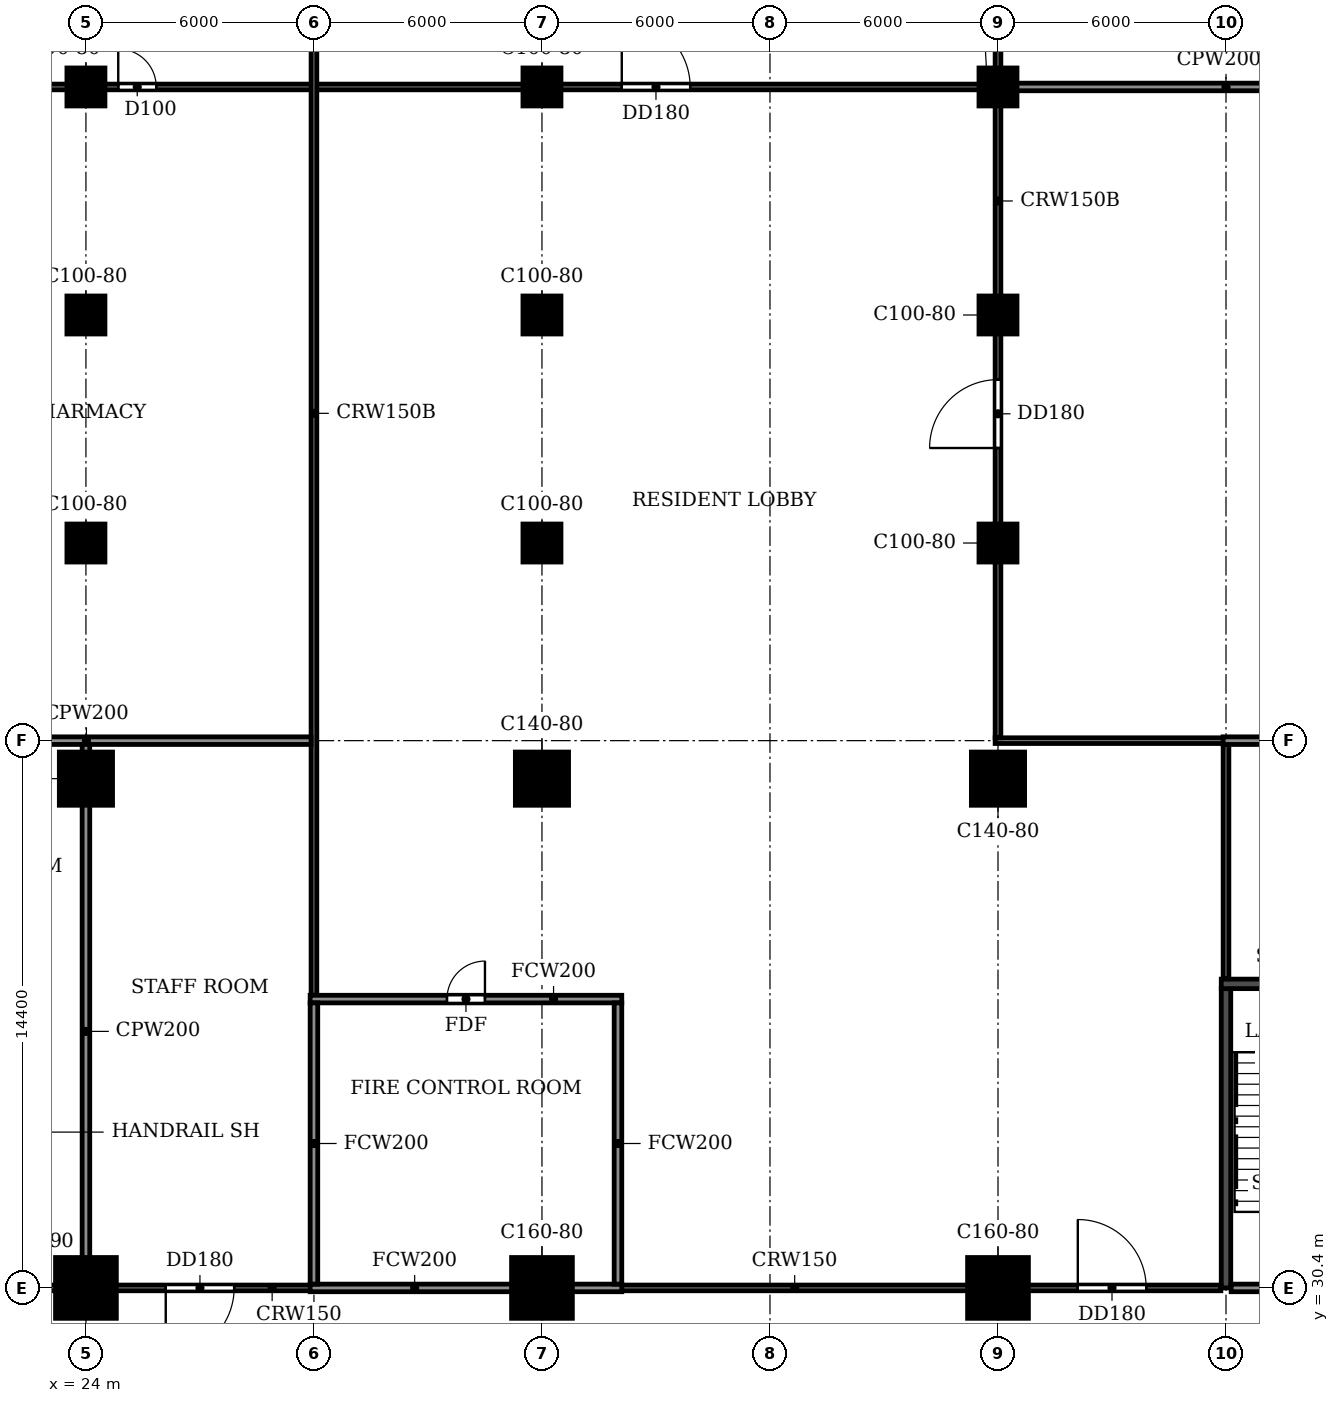
"""IFC4 building model, lengths in metres.
Left out: names, types, materials, properties, quantities, classifications, styles, units other than length and angle.
Written with IfcOpenShell. Run it as: python <this file> out.ifc"""

import sys

from ifc_helpers import new_model, si_unit, direction, frame, frame_2d, origin, origin_2d, place, context, subcontext, project, spatial, rectangle, extrude, source, transform, mapped, element, fill, save


model = new_model("IFC4")
c1 = context("Model", 3, precision=1e-05, world=origin(), true_north=direction((0.0, 1.0)))
c2 = subcontext(c1, "Body", "Model", "MODEL_VIEW")
j1 = project(units=[si_unit("LENGTHUNIT", "METRE"), si_unit("PLANEANGLEUNIT", "RADIAN")], contexts=[c1])
p1 = place(None, origin())
s1 = spatial("IfcSite", under=j1, at=p1, CompositionType="ELEMENT")
p2 = place(p1, origin())
s2 = spatial("IfcBuilding", under=s1, at=p2, CompositionType="ELEMENT")
p3 = place(p2, origin())
s3 = spatial("IfcBuildingStorey", under=s2, at=p3, CompositionType="ELEMENT", Elevation=0.0)
m1 = source(origin(), c2, "Body", "SweptSolid", [
    extrude(rectangle(XDim=1.6, YDim=1.6, at=origin_2d()), origin(), (0.0, 0.0, 1.0), 4.5),
])
p4 = place(p3, frame((24.0, 30.4, -0.3), z_axis=(0.0, 0.0, 1.0), x_axis=(1.0, 0.0, 0.0)))
e1 = element("IfcColumn", 1, at=p4, inside=s3, PredefinedType="COLUMN", context=c2, shape_type="MappedRepresentation", body=[
    mapped(m1, transform((0.0, 0.0, 0.0))),
])
m2 = source(origin(), c2, "Body", "SweptSolid", [
    extrude(rectangle(XDim=1.4, YDim=1.4, at=origin_2d()), origin(), (0.0, 0.0, 1.0), 4.5),
])
p5 = place(p3, frame((24.0, 43.8, -0.3), z_axis=(0.0, 0.0, 1.0), x_axis=(1.0, 0.0, 0.0)))
e2 = element("IfcColumn", 2, at=p5, inside=s3, PredefinedType="COLUMN", context=c2, shape_type="MappedRepresentation", body=[
    mapped(m2, transform((0.0, 0.0, 0.0))),
])
p6 = place(p3, frame((36.0, 30.4, -0.3), z_axis=(0.0, 0.0, 1.0), x_axis=(1.0, 0.0, 0.0)))
e3 = element("IfcColumn", 3, at=p6, inside=s3, PredefinedType="COLUMN", context=c2, shape_type="MappedRepresentation", body=[
    mapped(m1, transform((0.0, 0.0, 0.0))),
])
p7 = place(p3, frame((36.0, 43.8, -0.3), z_axis=(0.0, 0.0, 1.0), x_axis=(1.0, 0.0, 0.0)))
e4 = element("IfcColumn", 4, at=p7, inside=s3, PredefinedType="COLUMN", context=c2, shape_type="MappedRepresentation", body=[
    mapped(m2, transform((0.0, 0.0, 0.0))),
])
p8 = place(p3, frame((48.0, 30.4, -0.3), z_axis=(0.0, 0.0, 1.0), x_axis=(1.0, 0.0, 0.0)))
e5 = element("IfcColumn", 5, at=p8, inside=s3, PredefinedType="COLUMN", context=c2, shape_type="MappedRepresentation", body=[
    mapped(m1, transform((0.0, 0.0, 0.0))),
])
p9 = place(p3, frame((48.0, 43.8, -0.3), z_axis=(0.0, 0.0, 1.0), x_axis=(1.0, 0.0, 0.0)))
e6 = element("IfcColumn", 6, at=p9, inside=s3, PredefinedType="COLUMN", context=c2, shape_type="MappedRepresentation", body=[
    mapped(m2, transform((0.0, 0.0, 0.0))),
])
m3 = source(origin(), c2, "Body", "SweptSolid", [
    extrude(rectangle(XDim=1.0, YDim=1.0, at=origin_2d()), origin(), (0.0, 0.0, 1.0), 5.98),
])
for number, where, z_axis, x_axis in (
    (7, (24.0, 62.0, -0.3), (0.0, 0.0, 1.0), (1.0, 0.0, 0.0)),
    (8, (36.0, 62.0, -0.3), (0.0, 0.0, 1.0), (1.0, 0.0, 0.0)),
    (9, (48.0, 62.0, -0.3), (0.0, 0.0, 1.0), (1.0, 0.0, 0.0)),
    (10, (24.0, 56.0, -0.3), (0.0, 0.0, 1.0), (1.0, 0.0, 0.0)),
    (11, (36.0, 56.0, -0.3), (0.0, 0.0, 1.0), (1.0, 0.0, 0.0)),
    (12, (48.0, 56.0, -0.3), (0.0, 0.0, 1.0), (1.0, 0.0, 0.0)),
    (13, (24.0, 50.0, -0.3), (0.0, 0.0, 1.0), (1.0, 0.0, 0.0)),
    (14, (36.0, 50.0, -0.3), (0.0, 0.0, 1.0), (1.0, 0.0, 0.0)),
    (15, (48.0, 50.0, -0.3), (0.0, 0.0, 1.0), (1.0, 0.0, 0.0)),
):
    element("IfcColumn", number, at=place(p3, frame(where, z_axis=z_axis, x_axis=x_axis)), inside=s3, PredefinedType="COLUMN", context=c2, shape_type="MappedRepresentation", body=[
        mapped(m3, transform((0.0, 0.0, 0.0))),
    ])
p10 = place(p3, frame((53.875, 38.4, 0.0), z_axis=(0.0, 0.0, 1.0), x_axis=(1.0, 0.0, 0.0)))
e16 = element("IfcWall", 16, at=p10, inside=s3, PredefinedType="SOLIDWALL", context=c2, shape_type="SweptSolid", body=[
    extrude(rectangle(XDim=4.05, YDim=0.25, at=frame_2d((2.025, 0.0))), origin(), (0.0, 0.0, 1.0), 4.2),
])
p11 = place(p3, frame((54.0, 30.4, 0.0), z_axis=(0.0, 0.0, 1.0), x_axis=(0.0, 1.0, 0.0)))
e17 = element("IfcWall", 17, at=p11, inside=s3, PredefinedType="SOLIDWALL", context=c2, shape_type="SweptSolid", body=[
    extrude(rectangle(XDim=7.875, YDim=0.25, at=frame_2d((3.938, 0.0))), origin(), (0.0, 0.0, 1.0), 4.2),
])
p12 = place(p3, frame((21.935, 30.4, 0.0), z_axis=(0.0, 0.0, 1.0), x_axis=(1.0, 0.0, 0.0)))
e18 = element("IfcWall", 18, at=p12, inside=s3, PredefinedType="PARTITIONING", context=c2, shape_type="SweptSolid", body=[
    extrude(rectangle(XDim=8.165, YDim=0.15, at=frame_2d((4.083, 0.0))), origin(), (0.0, 0.0, 1.0), 4.2),
])
p13 = place(p12, frame((0.065, 0.0, 0.0)))
e19 = element("IfcOpeningElement", 19, at=p13, cuts=e18, PredefinedType="OPENING", context=c2, shape_type="SweptSolid", body=[
    extrude(rectangle(XDim=0.9, YDim=2.1, at=frame_2d((0.45, 1.05))), frame((0.0, 0.085, 0.0), z_axis=(0.0, -1.0, 0.0), x_axis=(1.0, 0.0, 0.0)), (0.0, 0.0, 1.0), 0.17),
])
p14 = place(p12, frame((4.165, 0.0, 0.0)))
e20 = element("IfcOpeningElement", 20, at=p14, cuts=e18, PredefinedType="OPENING", context=c2, shape_type="SweptSolid", body=[
    extrude(rectangle(XDim=1.8, YDim=2.1, at=frame_2d((0.9, 1.05))), frame((0.0, 0.085, 0.0), z_axis=(0.0, -1.0, 0.0), x_axis=(1.0, 0.0, 0.0)), (0.0, 0.0, 1.0), 0.17),
])
p15 = place(p3, frame((37.9, 30.4, 0.0), z_axis=(0.0, 0.0, 1.0), x_axis=(1.0, 0.0, 0.0)))
e21 = element("IfcWall", 21, at=p15, inside=s3, PredefinedType="PARTITIONING", context=c2, shape_type="SweptSolid", body=[
    extrude(rectangle(XDim=15.965, YDim=0.15, at=frame_2d((7.982, 0.0))), origin(), (0.0, 0.0, 1.0), 4.2),
])
p16 = place(p15, frame((12.2, 0.0, 0.0)))
e22 = element("IfcOpeningElement", 22, at=p16, cuts=e21, PredefinedType="OPENING", context=c2, shape_type="SweptSolid", body=[
    extrude(rectangle(XDim=1.8, YDim=2.1, at=frame_2d((0.9, 1.05))), frame((0.0, 0.085, 0.0), z_axis=(0.0, -1.0, 0.0), x_axis=(1.0, 0.0, 0.0)), (0.0, 0.0, 1.0), 0.17),
])
p17 = place(p3, frame((47.925, 44.8, 0.0), z_axis=(0.0, 0.0, 1.0), x_axis=(1.0, 0.0, 0.0)))
e23 = element("IfcWall", 23, at=p17, inside=s3, PredefinedType="PARTITIONING", context=c2, shape_type="SweptSolid", body=[
    extrude(rectangle(XDim=6.15, YDim=0.15, at=frame_2d((3.075, 0.0))), origin(), (0.0, 0.0, 1.0), 4.2),
])
p18 = place(p3, frame((-2.74, 62.0, 0.0), z_axis=(0.0, 0.0, 1.0), x_axis=(1.0, 0.0, 0.0)))
e24 = element("IfcWall", 24, at=p18, inside=s3, PredefinedType="PARTITIONING", context=c2, shape_type="SweptSolid", body=[
    extrude(rectangle(XDim=50.665, YDim=0.15, at=frame_2d((25.333, 0.0))), origin(), (0.0, 0.0, 1.0), 5.68),
])
p19 = place(p18, frame((9.44, 0.0, 0.0)))
e25 = element("IfcOpeningElement", 25, at=p19, cuts=e24, PredefinedType="OPENING", context=c2, shape_type="SweptSolid", body=[
    extrude(rectangle(XDim=1.8, YDim=2.1, at=frame_2d((0.9, 1.05))), frame((0.0, 0.085, 0.0), z_axis=(0.0, -1.0, 0.0), x_axis=(1.0, 0.0, 0.0)), (0.0, 0.0, 1.0), 0.17),
])
p20 = place(p18, frame((27.59, 0.0, 0.0)))
e26 = element("IfcOpeningElement", 26, at=p20, cuts=e24, PredefinedType="OPENING", context=c2, shape_type="SweptSolid", body=[
    extrude(rectangle(XDim=1.0, YDim=2.1, at=frame_2d((0.5, 1.05))), frame((0.0, 0.085, 0.0), z_axis=(0.0, -1.0, 0.0), x_axis=(1.0, 0.0, 0.0)), (0.0, 0.0, 1.0), 0.17),
])
p21 = place(p18, frame((40.84, 0.0, 0.0)))
e27 = element("IfcOpeningElement", 27, at=p21, cuts=e24, PredefinedType="OPENING", context=c2, shape_type="SweptSolid", body=[
    extrude(rectangle(XDim=1.8, YDim=2.1, at=frame_2d((0.9, 1.05))), frame((0.0, 0.085, 0.0), z_axis=(0.0, -1.0, 0.0), x_axis=(1.0, 0.0, 0.0)), (0.0, 0.0, 1.0), 0.17),
])
p22 = place(p3, frame((30.0, 38.1, 0.0), z_axis=(0.0, 0.0, 1.0), x_axis=(0.0, 1.0, 0.0)))
e28 = element("IfcWall", 28, at=p22, inside=s3, PredefinedType="PARTITIONING", context=c2, shape_type="SweptSolid", body=[
    extrude(rectangle(XDim=36.64, YDim=0.15, at=frame_2d((18.32, 0.0))), origin(), (0.0, 0.0, 1.0), 5.68),
])
p23 = place(p22, frame((29.85, 0.0, 0.0)))
e29 = element("IfcOpeningElement", 29, at=p23, cuts=e28, PredefinedType="OPENING", context=c2, shape_type="SweptSolid", body=[
    extrude(rectangle(XDim=0.9, YDim=2.1, at=frame_2d((0.45, 1.05))), frame((0.0, 0.085, 0.0), z_axis=(0.0, -1.0, 0.0), x_axis=(1.0, 0.0, 0.0)), (0.0, 0.0, 1.0), 0.17),
])
p24 = place(p3, frame((48.0, 44.875, 0.0), z_axis=(0.0, 0.0, 1.0), x_axis=(0.0, 1.0, 0.0)))
e30 = element("IfcWall", 30, at=p24, inside=s3, PredefinedType="PARTITIONING", context=c2, shape_type="SweptSolid", body=[
    extrude(rectangle(XDim=29.865, YDim=0.15, at=frame_2d((14.933, 0.0))), origin(), (0.0, 0.0, 1.0), 5.68),
])
p25 = place(p24, frame((23.975, 0.0, 0.0)))
e31 = element("IfcOpeningElement", 31, at=p25, cuts=e30, PredefinedType="OPENING", context=c2, shape_type="SweptSolid", body=[
    extrude(rectangle(XDim=1.8, YDim=2.1, at=frame_2d((0.9, 1.05))), frame((0.0, 0.085, 0.0), z_axis=(0.0, -1.0, 0.0), x_axis=(1.0, 0.0, 0.0)), (0.0, 0.0, 1.0), 0.17),
])
p26 = place(p24, frame((7.625, 0.0, 0.0)))
e32 = element("IfcOpeningElement", 32, at=p26, cuts=e30, PredefinedType="OPENING", context=c2, shape_type="SweptSolid", body=[
    extrude(rectangle(XDim=1.8, YDim=2.1, at=frame_2d((0.9, 1.05))), frame((0.0, 0.085, 0.0), z_axis=(0.0, -1.0, 0.0), x_axis=(1.0, 0.0, 0.0)), (0.0, 0.0, 1.0), 0.17),
])
p27 = place(p3, frame((54.0, 38.535, 0.0), z_axis=(0.0, 0.0, 1.0), x_axis=(0.0, 1.0, 0.0)))
e33 = element("IfcWall", 33, at=p27, inside=s3, PredefinedType="PARTITIONING", context=c2, shape_type="SweptSolid", body=[
    extrude(rectangle(XDim=6.165, YDim=0.15, at=frame_2d((3.083, 0.0))), origin(), (0.0, 0.0, 1.0), 4.2),
])
p28 = place(p3, frame((29.9, 30.4, 0.0), z_axis=(0.0, 0.0, 1.0), x_axis=(1.0, 0.0, 0.0)))
e34 = element("IfcWall", 34, at=p28, inside=s3, PredefinedType="SOLIDWALL", context=c2, shape_type="SweptSolid", body=[
    extrude(rectangle(XDim=8.2, YDim=0.2, at=frame_2d((4.1, 0.0))), origin(), (0.0, 0.0, 1.0), 4.2),
])
p29 = place(p3, frame((29.9, 38.0, 0.0), z_axis=(0.0, 0.0, 1.0), x_axis=(1.0, 0.0, 0.0)))
e35 = element("IfcWall", 35, at=p29, inside=s3, PredefinedType="SOLIDWALL", context=c2, shape_type="SweptSolid", body=[
    extrude(rectangle(XDim=8.2, YDim=0.2, at=frame_2d((4.1, 0.0))), origin(), (0.0, 0.0, 1.0), 4.2),
])
p30 = place(p29, frame((3.6, 0.0, 0.0)))
e36 = element("IfcOpeningElement", 36, at=p30, cuts=e35, PredefinedType="OPENING", context=c2, shape_type="SweptSolid", body=[
    extrude(rectangle(XDim=1.0, YDim=2.1, at=frame_2d((0.5, 1.05))), frame((0.0, 0.11, 0.0), z_axis=(0.0, -1.0, 0.0), x_axis=(1.0, 0.0, 0.0)), (0.0, 0.0, 1.0), 0.22),
])
for number, where, z_axis, x_axis in (
    (37, (30.0, 30.5, 0.0), (0.0, 0.0, 1.0), (0.0, 1.0, 0.0)),
    (38, (38.0, 30.5, 0.0), (0.0, 0.0, 1.0), (0.0, 1.0, 0.0)),
):
    element("IfcWall", number, at=place(p3, frame(where, z_axis=z_axis, x_axis=x_axis)), inside=s3, PredefinedType="SOLIDWALL", context=c2, shape_type="SweptSolid", body=[
        extrude(rectangle(XDim=7.4, YDim=0.2, at=frame_2d((3.7, 0.0))), origin(), (0.0, 0.0, 1.0), 4.2),
    ])
p31 = place(p3, frame((-2.74, 44.8, 0.0), z_axis=(0.0, 0.0, 1.0), x_axis=(1.0, 0.0, 0.0)))
e39 = element("IfcWall", 39, at=p31, inside=s3, PredefinedType="PARTITIONING", context=c2, shape_type="SweptSolid", body=[
    extrude(rectangle(XDim=32.665, YDim=0.2, at=frame_2d((16.333, 0.0))), origin(), (0.0, 0.0, 1.0), 4.2),
])
p32 = place(p31, frame((9.84, 0.0, 0.0)))
e40 = element("IfcOpeningElement", 40, at=p32, cuts=e39, PredefinedType="OPENING", context=c2, shape_type="SweptSolid", body=[
    extrude(rectangle(XDim=1.0, YDim=2.1, at=frame_2d((0.5, 1.05))), frame((0.0, 0.11, 0.0), z_axis=(0.0, -1.0, 0.0), x_axis=(1.0, 0.0, 0.0)), (0.0, 0.0, 1.0), 0.22),
])
p33 = place(p3, frame((53.925, 44.8, 0.0), z_axis=(0.0, 0.0, 1.0), x_axis=(1.0, 0.0, 0.0)))
e41 = element("IfcWall", 41, at=p33, inside=s3, PredefinedType="PARTITIONING", context=c2, shape_type="SweptSolid", body=[
    extrude(rectangle(XDim=18.175, YDim=0.2, at=frame_2d((9.087, 0.0))), origin(), (0.0, 0.0, 1.0), 4.2),
])
p34 = place(p3, frame((48.075, 62.0, 0.0), z_axis=(0.0, 0.0, 1.0), x_axis=(1.0, 0.0, 0.0)))
e42 = element("IfcWall", 42, at=p34, inside=s3, PredefinedType="PARTITIONING", context=c2, shape_type="SweptSolid", body=[
    extrude(rectangle(XDim=24.025, YDim=0.2, at=frame_2d((12.013, 0.0))), origin(), (0.0, 0.0, 1.0), 5.68),
])
p35 = place(p3, frame((24.0, 30.475, 0.0), z_axis=(0.0, 0.0, 1.0), x_axis=(0.0, 1.0, 0.0)))
e43 = element("IfcWall", 43, at=p35, inside=s3, PredefinedType="PARTITIONING", context=c2, shape_type="SweptSolid", body=[
    extrude(rectangle(XDim=14.225, YDim=0.2, at=frame_2d((7.112, 0.0))), origin(), (0.0, 0.0, 1.0), 4.2),
])
p36 = place(p3, frame((54.135, 30.4, 0.0), z_axis=(0.0, 0.0, 1.0), x_axis=(1.0, 0.0, 0.0)))
e44 = element("IfcWall", 44, at=p36, inside=s3, PredefinedType="PARTITIONING", context=c2, shape_type="SweptSolid", body=[
    extrude(rectangle(XDim=3.53, YDim=0.2, at=frame_2d((1.765, 0.0))), origin(), (0.0, 0.0, 1.0), 4.2),
])
p37 = place(p36, frame((1.265, 0.0, 0.0)))
e45 = element("IfcOpeningElement", 45, at=p37, cuts=e44, PredefinedType="OPENING", context=c2, shape_type="SweptSolid", body=[
    extrude(rectangle(XDim=1.0, YDim=2.1, at=frame_2d((0.5, 1.05))), frame((0.0, 0.11, 0.0), z_axis=(0.0, -1.0, 0.0), x_axis=(1.0, 0.0, 0.0)), (0.0, 0.0, 1.0), 0.22),
])
p38 = place(p14, frame((1.8, 0.0, 0.0), z_axis=(0.0, 0.0, 1.0), x_axis=(-1.0, 0.0, 0.0)))
e46 = element("IfcDoor", 46, at=p38, inside=s3, OperationType="DOUBLE_DOOR_SINGLE_SWING", PredefinedType="DOOR", context=c2, shape_type="SweptSolid", body=[
    extrude(rectangle(XDim=1.8, YDim=2.1, at=frame_2d((0.9, 1.05))), frame((0.0, 0.025, 0.0), z_axis=(0.0, -1.0, 0.0), x_axis=(1.0, 0.0, 0.0)), (0.0, 0.0, 1.0), 0.05),
])
fill(e20, e46)
p39 = place(p20, origin())
e47 = element("IfcDoor", 47, at=p39, inside=s3, OperationType="SINGLE_SWING_LEFT", PredefinedType="DOOR", context=c2, shape_type="SweptSolid", body=[
    extrude(rectangle(XDim=1.0, YDim=2.1, at=frame_2d((0.5, 1.05))), frame((0.0, 0.025, 0.0), z_axis=(0.0, -1.0, 0.0), x_axis=(1.0, 0.0, 0.0)), (0.0, 0.0, 1.0), 0.05),
])
fill(e26, e47)
p40 = place(p21, origin())
e48 = element("IfcDoor", 48, at=p40, inside=s3, OperationType="DOUBLE_DOOR_SINGLE_SWING", PredefinedType="DOOR", context=c2, shape_type="SweptSolid", body=[
    extrude(rectangle(XDim=1.8, YDim=2.1, at=frame_2d((0.9, 1.05))), frame((0.0, 0.025, 0.0), z_axis=(0.0, -1.0, 0.0), x_axis=(1.0, 0.0, 0.0)), (0.0, 0.0, 1.0), 0.05),
])
fill(e27, e48)
p41 = place(p30, origin())
e49 = element("IfcDoor", 49, at=p41, inside=s3, OperationType="SINGLE_SWING_RIGHT", PredefinedType="DOOR", context=c2, shape_type="SweptSolid", body=[
    extrude(rectangle(XDim=1.0, YDim=2.1, at=frame_2d((0.5, 1.05))), frame((0.0, 0.025, 0.0), z_axis=(0.0, -1.0, 0.0), x_axis=(1.0, 0.0, 0.0)), (0.0, 0.0, 1.0), 0.05),
])
fill(e36, e49)
p42 = place(p26, origin())
e50 = element("IfcDoor", 50, at=p42, inside=s3, OperationType="DOUBLE_DOOR_SINGLE_SWING", PredefinedType="DOOR", context=c2, shape_type="SweptSolid", body=[
    extrude(rectangle(XDim=1.8, YDim=2.1, at=frame_2d((0.9, 1.05))), frame((0.0, 0.025, 0.0), z_axis=(0.0, -1.0, 0.0), x_axis=(1.0, 0.0, 0.0)), (0.0, 0.0, 1.0), 0.05),
])
fill(e32, e50)
p43 = place(p16, origin())
e51 = element("IfcDoor", 51, at=p43, inside=s3, OperationType="DOUBLE_DOOR_SINGLE_SWING", PredefinedType="DOOR", context=c2, shape_type="SweptSolid", body=[
    extrude(rectangle(XDim=1.8, YDim=2.1, at=frame_2d((0.9, 1.05))), frame((0.0, 0.025, 0.0), z_axis=(0.0, -1.0, 0.0), x_axis=(1.0, 0.0, 0.0)), (0.0, 0.0, 1.0), 0.05),
])
fill(e22, e51)
save(model, sys.argv[1])
